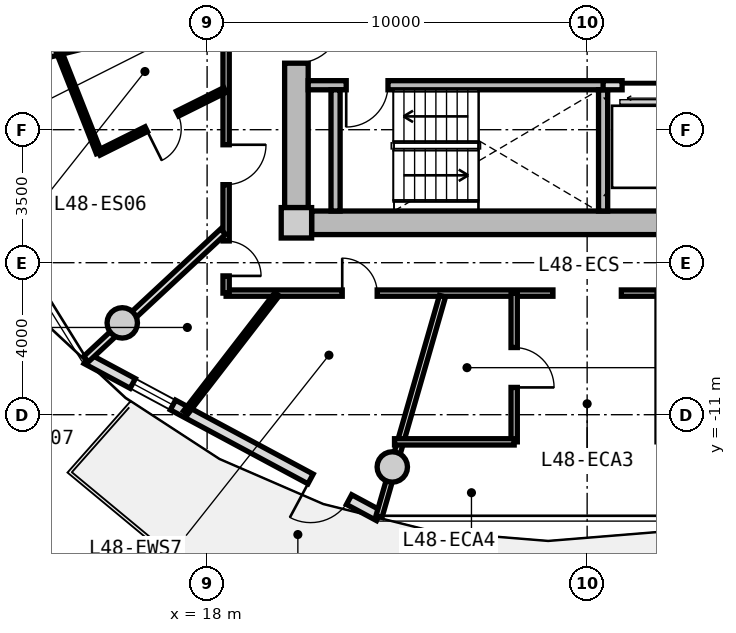
"""IFC4 building model, lengths in metres.
Left out: names, types, materials, properties, quantities, classifications, styles, units other than length and angle.
Written with IfcOpenShell. Run it as: python <this file> out.ifc"""

import sys

from ifc_helpers import new_model, si_unit, direction, frame, frame_2d, origin, origin_2d, place, context, subcontext, project, spatial, rectangle, circle, extrude, source, transform, mapped, element, fill, save


model = new_model("IFC4")
c1 = context("Model", 3, precision=1e-05, world=origin(), true_north=direction((0.0, 1.0)))
c2 = subcontext(c1, "Body", "Model", "MODEL_VIEW")
j1 = project(units=[si_unit("LENGTHUNIT", "METRE"), si_unit("PLANEANGLEUNIT", "RADIAN")], contexts=[c1])
p1 = place(None, origin())
s1 = spatial("IfcSite", under=j1, at=p1, CompositionType="ELEMENT")
p2 = place(p1, origin())
s2 = spatial("IfcBuilding", under=s1, at=p2, CompositionType="ELEMENT")
p3 = place(p2, frame((0.0, 0.0, 155.65)))
s3 = spatial("IfcBuildingStorey", under=s2, at=p3, CompositionType="ELEMENT", Elevation=155.65)
m1 = source(origin(), c2, "Body", "SweptSolid", [
    extrude(rectangle(XDim=0.8, YDim=0.8, at=origin_2d()), origin(), (0.0, 0.0, 1.0), 3.05),
])
p4 = place(p3, frame((20.35, -5.95, 0.0), z_axis=(0.0, 0.0, 1.0), x_axis=(1.0, 0.0, 0.0)))
e1 = element("IfcColumn", 1, at=p4, inside=s3, PredefinedType="COLUMN", context=c2, shape_type="MappedRepresentation", body=[
    mapped(m1, transform((0.0, 0.0, 0.0), x_axis=(1.0, 0.0, 0.0), y_axis=(0.0, 1.0, 0.0), z_axis=(0.0, 0.0, 1.0), scale=1.0)),
])
m2 = source(origin(), c2, "Body", "SweptSolid", [
    extrude(rectangle(XDim=14.5, YDim=0.62, at=frame_2d((7.25, 0.0))), origin(), (0.0, 0.0, 1.0), 2.81),
])
p5 = place(p3, frame((35.25, -5.95, 0.0), z_axis=(0.0, 0.0, 1.0), x_axis=(-1.0, 0.0, 0.0)))
e2 = element("IfcWall", 2, at=p5, inside=s3, PredefinedType="SHEAR", context=c2, shape_type="MappedRepresentation", body=[
    mapped(m2, transform((0.0, 0.0, 0.0), x_axis=(1.0, 0.0, 0.0), y_axis=(0.0, 1.0, 0.0), z_axis=(0.0, 0.0, 1.0), scale=1.0)),
])
m3 = source(origin(), c2, "Body", "SweptSolid", [
    extrude(rectangle(XDim=11.1, YDim=0.62, at=frame_2d((5.55, 0.0))), origin(), (0.0, 0.0, 1.0), 2.81),
])
p6 = place(p3, frame((20.35, -5.55, 0.0), z_axis=(0.0, 0.0, 1.0), x_axis=(0.0, 1.0, 0.0)))
e3 = element("IfcWall", 3, at=p6, inside=s3, PredefinedType="SHEAR", context=c2, shape_type="MappedRepresentation", body=[
    mapped(m3, transform((0.0, 0.0, 0.0), x_axis=(1.0, 0.0, 0.0), y_axis=(0.0, 1.0, 0.0), z_axis=(0.0, 0.0, 1.0), scale=1.0)),
])
p7 = place(p6, frame((3.8, 0.0, 0.0)))
e4 = element("IfcOpeningElement", 4, at=p7, cuts=e3, PredefinedType="OPENING", context=c2, shape_type="SweptSolid", body=[
    extrude(rectangle(XDim=1.2, YDim=2.15, at=frame_2d((0.6, 1.075))), frame((0.0, 0.32, 0.0), z_axis=(0.0, -1.0, 0.0), x_axis=(1.0, 0.0, 0.0)), (0.0, 0.0, 1.0), 0.64),
])
m4 = source(origin(), c2, "Body", "SweptSolid", [
    extrude(circle(Radius=0.4, at=origin_2d()), origin(), (0.0, 0.0, 1.0), 3.05),
])
for number, where, z_axis, x_axis in (
    (5, (15.767, -8.584, 0.0), (0.0, 0.0, 1.0), (1.0, 0.0, 0.0)),
    (6, (22.873, -12.375, 0.0), (0.0, 0.0, 1.0), (1.0, 0.0, 0.0)),
):
    element("IfcColumn", number, at=place(p3, frame(where, z_axis=z_axis, x_axis=x_axis)), inside=s3, PredefinedType="COLUMN", context=c2, shape_type="MappedRepresentation", body=[
        mapped(m4, transform((0.0, 0.0, 0.0), x_axis=(1.0, 0.0, 0.0), y_axis=(0.0, 1.0, 0.0), z_axis=(0.0, 0.0, 1.0), scale=1.0)),
    ])
m5 = source(origin(), c2, "Body", "SweptSolid", [
    extrude(rectangle(XDim=8.742, YDim=0.29, at=frame_2d((4.371, 0.0))), origin(), (0.0, 0.0, 1.0), 2.81),
])
p8 = place(p3, frame((22.529, -13.66, 0.0), z_axis=(0.0, 0.0, 1.0), x_axis=(-0.880998740657, 0.473118609823, 0.0)))
e7 = element("IfcWall", 7, at=p8, inside=s3, PredefinedType="SOLIDWALL", context=c2, shape_type="MappedRepresentation", body=[
    mapped(m5, transform((0.0, 0.0, 0.0), x_axis=(1.0, 0.0, 0.0), y_axis=(0.0, 1.0, 0.0), z_axis=(0.0, 0.0, 1.0), scale=1.0)),
])
p9 = place(p8, frame((0.9, 0.0, 0.0)))
e8 = element("IfcOpeningElement", 8, at=p9, cuts=e7, PredefinedType="OPENING", context=c2, shape_type="SweptSolid", body=[
    extrude(rectangle(XDim=1.15, YDim=2.25, at=frame_2d((0.575, 1.125))), frame((0.0, 0.155, 0.0), z_axis=(0.0, -1.0, 0.0), x_axis=(1.0, 0.0, 0.0)), (0.0, 0.0, 1.0), 0.31),
])
p10 = place(p8, frame((6.161, 0.0, 0.85)))
e9 = element("IfcOpeningElement", 9, at=p10, cuts=e7, PredefinedType="OPENING", context=c2, shape_type="SweptSolid", body=[
    extrude(rectangle(XDim=1.2, YDim=1.5, at=frame_2d((0.6, 0.75))), frame((0.0, 0.155, 0.0), z_axis=(0.0, -1.0, 0.0), x_axis=(1.0, 0.0, 0.0)), (0.0, 0.0, 1.0), 0.31),
])
m6 = source(origin(), c2, "Body", "SweptSolid", [
    extrude(rectangle(XDim=7.88, YDim=0.24, at=frame_2d((3.94, 0.0))), origin(), (0.0, 0.0, 1.0), 2.81),
])
p11 = place(p3, frame((20.66, -2.33, 0.0), z_axis=(0.0, 0.0, 1.0), x_axis=(1.0, 0.0, 0.0)))
e10 = element("IfcWall", 10, at=p11, inside=s3, PredefinedType="PARTITIONING", context=c2, shape_type="MappedRepresentation", body=[
    mapped(m6, transform((0.0, 0.0, 0.0), x_axis=(1.0, 0.0, 0.0), y_axis=(0.0, 1.0, 0.0), z_axis=(0.0, 0.0, 1.0), scale=1.0)),
])
p12 = place(p11, frame((1.0, 0.0, 0.0)))
e11 = element("IfcOpeningElement", 11, at=p12, cuts=e10, PredefinedType="OPENING", context=c2, shape_type="SweptSolid", body=[
    extrude(rectangle(XDim=1.1, YDim=2.15, at=frame_2d((0.55, 1.075))), frame((0.0, 0.13, 0.0), z_axis=(0.0, -1.0, 0.0), x_axis=(1.0, 0.0, 0.0)), (0.0, 0.0, 1.0), 0.26),
])
m7 = source(origin(), c2, "Body", "SweptSolid", [
    extrude(rectangle(XDim=3.19, YDim=0.24, at=frame_2d((1.595, 0.0))), origin(), (0.0, 0.0, 1.0), 2.81),
])
for number, where, z_axis, x_axis in (
    (12, (21.38, -5.64, 0.0), (0.0, 0.0, 1.0), (0.0, 1.0, 0.0)),
    (13, (28.42, -5.64, 0.0), (0.0, 0.0, 1.0), (0.0, 1.0, 0.0)),
):
    element("IfcWall", number, at=place(p3, frame(where, z_axis=z_axis, x_axis=x_axis)), inside=s3, PredefinedType="PARTITIONING", context=c2, shape_type="MappedRepresentation", body=[
        mapped(m7, transform((0.0, 0.0, 0.0), x_axis=(1.0, 0.0, 0.0), y_axis=(0.0, 1.0, 0.0), z_axis=(0.0, 0.0, 1.0), scale=1.0)),
    ])
m8 = source(origin(), c2, "Body", "SweptSolid", [
    extrude(rectangle(XDim=4.13, YDim=0.24, at=frame_2d((2.065, 0.0))), origin(), (0.0, 0.0, 1.0), 2.795),
])
p13 = place(p3, frame((28.42, -2.33, 0.0), z_axis=(0.0, 0.0, 1.0), x_axis=(1.0, 0.0, 0.0)))
e14 = element("IfcWall", 14, at=p13, inside=s3, PredefinedType="PARTITIONING", context=c2, shape_type="MappedRepresentation", body=[
    mapped(m8, transform((0.0, 0.0, 0.0), x_axis=(1.0, 0.0, 0.0), y_axis=(0.0, 1.0, 0.0), z_axis=(0.0, 0.0, 1.0), scale=1.0)),
])
p14 = place(p13, frame((0.5, 0.0, 0.0)))
e15 = element("IfcOpeningElement", 15, at=p14, cuts=e14, PredefinedType="OPENING", context=c2, shape_type="SweptSolid", body=[
    extrude(rectangle(XDim=1.1, YDim=2.2, at=frame_2d((0.55, 1.1))), frame((0.0, 0.13, 0.0), z_axis=(0.0, -1.0, 0.0), x_axis=(1.0, 0.0, 0.0)), (0.0, 0.0, 1.0), 0.26),
])
p15 = place(p13, frame((2.55, 0.0, 0.0)))
e16 = element("IfcOpeningElement", 16, at=p15, cuts=e14, PredefinedType="OPENING", context=c2, shape_type="SweptSolid", body=[
    extrude(rectangle(XDim=1.1, YDim=2.2, at=frame_2d((0.55, 1.1))), frame((0.0, 0.13, 0.0), z_axis=(0.0, -1.0, 0.0), x_axis=(1.0, 0.0, 0.0)), (0.0, 0.0, 1.0), 0.26),
])
m9 = source(origin(), c2, "Body", "SweptSolid", [
    extrude(rectangle(XDim=8.6, YDim=0.165, at=frame_2d((4.3, 0.0))), origin(), (0.0, 0.0, 1.0), 2.795),
])
p16 = place(p3, frame((37.5, -7.8, 0.0), z_axis=(0.0, 0.0, 1.0), x_axis=(-1.0, 0.0, 0.0)))
e17 = element("IfcWall", 17, at=p16, inside=s3, PredefinedType="PARTITIONING", context=c2, shape_type="MappedRepresentation", body=[
    mapped(m9, transform((0.0, 0.0, 0.0), x_axis=(1.0, 0.0, 0.0), y_axis=(0.0, 1.0, 0.0), z_axis=(0.0, 0.0, 1.0), scale=1.0)),
])
p17 = place(p16, frame((3.359, 0.0, 0.0)))
e18 = element("IfcOpeningElement", 18, at=p17, cuts=e17, PredefinedType="OPENING", context=c2, shape_type="SweptSolid", body=[
    extrude(rectangle(XDim=1.05, YDim=2.15, at=frame_2d((0.525, 1.075))), frame((0.0, 0.093, 0.0), z_axis=(0.0, -1.0, 0.0), x_axis=(1.0, 0.0, 0.0)), (0.0, 0.0, 1.0), 0.185),
])
p18 = place(p3, frame((27.1, -7.8, 0.0), z_axis=(0.0, 0.0, 1.0), x_axis=(-1.0, 0.0, 0.0)))
e19 = element("IfcWall", 19, at=p18, inside=s3, PredefinedType="PARTITIONING", context=c2, shape_type="MappedRepresentation", body=[
    mapped(m9, transform((0.0, 0.0, 0.0), x_axis=(1.0, 0.0, 0.0), y_axis=(0.0, 1.0, 0.0), z_axis=(0.0, 0.0, 1.0), scale=1.0)),
])
p19 = place(p18, frame((4.625, 0.0, 0.0)))
e20 = element("IfcOpeningElement", 20, at=p19, cuts=e19, PredefinedType="OPENING", context=c2, shape_type="SweptSolid", body=[
    extrude(rectangle(XDim=0.92, YDim=2.1, at=frame_2d((0.46, 1.05))), frame((0.0, 0.093, 0.0), z_axis=(0.0, -1.0, 0.0), x_axis=(1.0, 0.0, 0.0)), (0.0, 0.0, 1.0), 0.185),
])
m10 = source(origin(), c2, "Body", "SweptSolid", [
    extrude(rectangle(XDim=15.6, YDim=0.165, at=frame_2d((7.8, 0.0))), origin(), (0.0, 0.0, 1.0), 2.795),
])
p20 = place(p3, frame((18.5, -7.8, 0.0), z_axis=(0.0, 0.0, 1.0), x_axis=(0.0, 1.0, 0.0)))
e21 = element("IfcWall", 21, at=p20, inside=s3, PredefinedType="PARTITIONING", context=c2, shape_type="MappedRepresentation", body=[
    mapped(m10, transform((0.0, 0.0, 0.0), x_axis=(1.0, 0.0, 0.0), y_axis=(0.0, 1.0, 0.0), z_axis=(0.0, 0.0, 1.0), scale=1.0)),
])
p21 = place(p20, frame((12.591, 0.0, 0.0)))
e22 = element("IfcOpeningElement", 22, at=p21, cuts=e21, PredefinedType="OPENING", context=c2, shape_type="SweptSolid", body=[
    extrude(rectangle(XDim=1.05, YDim=2.15, at=frame_2d((0.525, 1.075))), frame((0.0, 0.093, 0.0), z_axis=(0.0, -1.0, 0.0), x_axis=(1.0, 0.0, 0.0)), (0.0, 0.0, 1.0), 0.185),
])
p22 = place(p20, frame((8.081, 0.0, 0.0)))
e23 = element("IfcOpeningElement", 23, at=p22, cuts=e21, PredefinedType="OPENING", context=c2, shape_type="SweptSolid", body=[
    extrude(rectangle(XDim=1.05, YDim=2.15, at=frame_2d((0.525, 1.075))), frame((0.0, 0.093, 0.0), z_axis=(0.0, -1.0, 0.0), x_axis=(1.0, 0.0, 0.0)), (0.0, 0.0, 1.0), 0.185),
])
p23 = place(p20, frame((2.854, 0.0, 0.0)))
e24 = element("IfcOpeningElement", 24, at=p23, cuts=e21, PredefinedType="OPENING", context=c2, shape_type="SweptSolid", body=[
    extrude(rectangle(XDim=1.05, YDim=2.15, at=frame_2d((0.525, 1.075))), frame((0.0, 0.093, 0.0), z_axis=(0.0, -1.0, 0.0), x_axis=(1.0, 0.0, 0.0)), (0.0, 0.0, 1.0), 0.185),
])
p24 = place(p20, frame((0.452, 0.0, 0.0)))
e25 = element("IfcOpeningElement", 25, at=p24, cuts=e21, PredefinedType="OPENING", context=c2, shape_type="SweptSolid", body=[
    extrude(rectangle(XDim=0.92, YDim=2.1, at=frame_2d((0.46, 1.05))), frame((0.0, 0.093, 0.0), z_axis=(0.0, -1.0, 0.0), x_axis=(1.0, 0.0, 0.0)), (0.0, 0.0, 1.0), 0.185),
])
m11 = source(origin(), c2, "Body", "SweptSolid", [
    extrude(rectangle(XDim=6.035, YDim=0.165, at=frame_2d((3.018, 0.0))), origin(), (0.0, 0.0, 1.0), 2.345),
])
p25 = place(p3, frame((24.194, -7.88, 0.0), z_axis=(0.0, 0.0, 1.0), x_axis=(-0.276809454862, -0.960924828329, 0.0)))
e26 = element("IfcWall", 26, at=p25, inside=s3, PredefinedType="PARTITIONING", context=c2, shape_type="MappedRepresentation", body=[
    mapped(m11, transform((0.0, 0.0, 0.0), x_axis=(1.0, 0.0, 0.0), y_axis=(0.0, 1.0, 0.0), z_axis=(0.0, 0.0, 1.0), scale=1.0)),
])
m12 = source(origin(), c2, "Body", "SweptSolid", [
    extrude(rectangle(XDim=3.915, YDim=0.165, at=frame_2d((1.957, 0.0))), origin(), (0.0, 0.0, 1.0), 2.795),
])
p26 = place(p3, frame((26.08, -11.715, 0.0), z_axis=(0.0, 0.0, 1.0), x_axis=(0.0, 1.0, 0.0)))
e27 = element("IfcWall", 27, at=p26, inside=s3, PredefinedType="PARTITIONING", context=c2, shape_type="MappedRepresentation", body=[
    mapped(m12, transform((0.0, 0.0, 0.0), x_axis=(1.0, 0.0, 0.0), y_axis=(0.0, 1.0, 0.0), z_axis=(0.0, 0.0, 1.0), scale=1.0)),
])
p27 = place(p26, frame((1.432, 0.0, 0.0)))
e28 = element("IfcOpeningElement", 28, at=p27, cuts=e27, PredefinedType="OPENING", context=c2, shape_type="SweptSolid", body=[
    extrude(rectangle(XDim=1.05, YDim=2.15, at=frame_2d((0.525, 1.075))), frame((0.0, 0.093, 0.0), z_axis=(0.0, -1.0, 0.0), x_axis=(1.0, 0.0, 0.0)), (0.0, 0.0, 1.0), 0.185),
])
m13 = source(origin(), c2, "Body", "SweptSolid", [
    extrude(rectangle(XDim=3.149, YDim=0.165, at=frame_2d((1.574, 0.0))), origin(), (0.0, 0.0, 1.0), 2.795),
])
p28 = place(p3, frame((22.931, -11.715, 0.0), z_axis=(0.0, 0.0, 1.0), x_axis=(1.0, 0.0, 0.0)))
e29 = element("IfcWall", 29, at=p28, inside=s3, PredefinedType="PARTITIONING", context=c2, shape_type="MappedRepresentation", body=[
    mapped(m13, transform((0.0, 0.0, 0.0), x_axis=(1.0, 0.0, 0.0), y_axis=(0.0, 1.0, 0.0), z_axis=(0.0, 0.0, 1.0), scale=1.0)),
])
m14 = source(origin(), c2, "Body", "SweptSolid", [
    extrude(rectangle(XDim=8.305, YDim=0.19, at=frame_2d((4.153, 0.0))), origin(), (0.0, 0.0, 1.0), 2.345),
])
p29 = place(p3, frame((18.42, -0.357, 0.0), z_axis=(0.0, 0.0, 1.0), x_axis=(-0.970309994378, -0.241864662175, 0.0)))
e30 = element("IfcWall", 30, at=p29, inside=s3, PredefinedType="PARTITIONING", context=c2, shape_type="MappedRepresentation", body=[
    mapped(m14, transform((0.0, 0.0, 0.0), x_axis=(1.0, 0.0, 0.0), y_axis=(0.0, 1.0, 0.0), z_axis=(0.0, 0.0, 1.0), scale=1.0)),
])
m15 = source(origin(), c2, "Body", "SweptSolid", [
    extrude(rectangle(XDim=4.927, YDim=0.19, at=frame_2d((2.463, 0.0))), origin(), (0.0, 0.0, 1.0), 2.345),
])
p30 = place(p3, frame((18.42, -6.183, 0.0), z_axis=(0.0, 0.0, 1.0), x_axis=(-0.732191335987, -0.681098999783, 0.0)))
e31 = element("IfcWall", 31, at=p30, inside=s3, PredefinedType="PARTITIONING", context=c2, shape_type="MappedRepresentation", body=[
    mapped(m15, transform((0.0, 0.0, 0.0), x_axis=(1.0, 0.0, 0.0), y_axis=(0.0, 1.0, 0.0), z_axis=(0.0, 0.0, 1.0), scale=1.0)),
])
m16 = source(origin(), c2, "Body", "SweptSolid", [
    extrude(rectangle(XDim=3.707, YDim=0.14, at=frame_2d((1.854, 0.0))), origin(), (0.0, 0.0, 1.0), 2.795),
])
p31 = place(p3, frame((18.47, -2.456, 0.0), z_axis=(0.0, 0.0, 1.0), x_axis=(-0.895347377717, -0.44536846904, 0.0)))
e32 = element("IfcWall", 32, at=p31, inside=s3, PredefinedType="PARTITIONING", context=c2, shape_type="MappedRepresentation", body=[
    mapped(m16, transform((0.0, 0.0, 0.0), x_axis=(1.0, 0.0, 0.0), y_axis=(0.0, 1.0, 0.0), z_axis=(0.0, 0.0, 1.0), scale=1.0)),
])
p32 = place(p31, frame((1.394, 0.0, 0.0)))
e33 = element("IfcOpeningElement", 33, at=p32, cuts=e32, PredefinedType="OPENING", context=c2, shape_type="SweptSolid", body=[
    extrude(rectangle(XDim=0.92, YDim=2.1, at=frame_2d((0.46, 1.05))), frame((0.0, 0.08, 0.0), z_axis=(0.0, -1.0, 0.0), x_axis=(1.0, 0.0, 0.0)), (0.0, 0.0, 1.0), 0.16),
])
m17 = source(origin(), c2, "Body", "SweptSolid", [
    extrude(rectangle(XDim=2.854, YDim=0.14, at=frame_2d((1.427, 0.0))), origin(), (0.0, 0.0, 1.0), 2.795),
])
p33 = place(p3, frame((15.151, -4.107, 0.0), z_axis=(0.0, 0.0, 1.0), x_axis=(-0.366932834407, 0.930247437532, 0.0)))
e34 = element("IfcWall", 34, at=p33, inside=s3, PredefinedType="PARTITIONING", context=c2, shape_type="MappedRepresentation", body=[
    mapped(m17, transform((0.0, 0.0, 0.0), x_axis=(1.0, 0.0, 0.0), y_axis=(0.0, 1.0, 0.0), z_axis=(0.0, 0.0, 1.0), scale=1.0)),
])
m18 = source(origin(), c2, "Body", "SweptSolid", [
    extrude(rectangle(XDim=3.937, YDim=0.14, at=frame_2d((1.968, 0.0))), origin(), (0.0, 0.0, 1.0), 2.795),
])
p34 = place(p3, frame((19.84, -7.83, 0.0), z_axis=(0.0, 0.0, 1.0), x_axis=(-0.611055586441, -0.79158768957, 0.0)))
e35 = element("IfcWall", 35, at=p34, inside=s3, PredefinedType="PARTITIONING", context=c2, shape_type="MappedRepresentation", body=[
    mapped(m18, transform((0.0, 0.0, 0.0), x_axis=(1.0, 0.0, 0.0), y_axis=(0.0, 1.0, 0.0), z_axis=(0.0, 0.0, 1.0), scale=1.0)),
])
m19 = source(origin(), c2, "Body", "SweptSolid", [
    extrude(rectangle(XDim=1.15, YDim=2.25, at=frame_2d((0.575, 1.125))), frame((0.0, 0.025, 0.0), z_axis=(0.0, -1.0, 0.0), x_axis=(1.0, 0.0, 0.0)), (0.0, 0.0, 1.0), 0.05),
])
p35 = place(p9, origin())
e36 = element("IfcDoor", 36, at=p35, inside=s3, OperationType="SINGLE_SWING_RIGHT", PredefinedType="DOOR", context=c2, shape_type="MappedRepresentation", body=[
    mapped(m19, transform((0.0, 0.0, 0.0), x_axis=(1.0, 0.0, 0.0), y_axis=(0.0, 1.0, 0.0), z_axis=(0.0, 0.0, 1.0), scale=1.0)),
])
fill(e8, e36)
m20 = source(origin(), c2, "Body", "SweptSolid", [
    extrude(rectangle(XDim=1.2, YDim=1.5, at=frame_2d((0.6, 0.75))), frame((0.0, 0.03, 0.0), z_axis=(0.0, -1.0, 0.0), x_axis=(1.0, 0.0, 0.0)), (0.0, 0.0, 1.0), 0.06),
])
p36 = place(p10, origin())
e37 = element("IfcWindow", 37, at=p36, inside=s3, PartitioningType="SINGLE_PANEL", PredefinedType="WINDOW", context=c2, shape_type="MappedRepresentation", body=[
    mapped(m20, transform((0.0, 0.0, 0.0), x_axis=(1.0, 0.0, 0.0), y_axis=(0.0, 1.0, 0.0), z_axis=(0.0, 0.0, 1.0), scale=1.0)),
])
fill(e9, e37)
m21 = source(origin(), c2, "Body", "SweptSolid", [
    extrude(rectangle(XDim=1.1, YDim=2.15, at=frame_2d((0.55, 1.075))), frame((0.0, 0.025, 0.0), z_axis=(0.0, -1.0, 0.0), x_axis=(1.0, 0.0, 0.0)), (0.0, 0.0, 1.0), 0.05),
])
p37 = place(p12, frame((1.1, 0.0, 0.0), z_axis=(0.0, 0.0, 1.0), x_axis=(-1.0, 0.0, 0.0)))
e38 = element("IfcDoor", 38, at=p37, inside=s3, OperationType="SINGLE_SWING_RIGHT", PredefinedType="DOOR", context=c2, shape_type="MappedRepresentation", body=[
    mapped(m21, transform((0.0, 0.0, 0.0), x_axis=(1.0, 0.0, 0.0), y_axis=(0.0, 1.0, 0.0), z_axis=(0.0, 0.0, 1.0), scale=1.0)),
])
fill(e11, e38)
m22 = source(origin(), c2, "Body", "SweptSolid", [
    extrude(rectangle(XDim=1.2, YDim=2.15, at=frame_2d((0.6, 1.075))), frame((0.0, 0.025, 0.0), z_axis=(0.0, -1.0, 0.0), x_axis=(1.0, 0.0, 0.0)), (0.0, 0.0, 1.0), 0.05),
])
p38 = place(p7, frame((1.2, 0.0, 0.0), z_axis=(0.0, 0.0, 1.0), x_axis=(-1.0, 0.0, 0.0)))
e39 = element("IfcDoor", 39, at=p38, inside=s3, OperationType="SINGLE_SWING_LEFT", PredefinedType="DOOR", context=c2, shape_type="MappedRepresentation", body=[
    mapped(m22, transform((0.0, 0.0, 0.0), x_axis=(1.0, 0.0, 0.0), y_axis=(0.0, 1.0, 0.0), z_axis=(0.0, 0.0, 1.0), scale=1.0)),
])
fill(e4, e39)
m23 = source(origin(), c2, "Body", "SweptSolid", [
    extrude(rectangle(XDim=1.1, YDim=2.2, at=frame_2d((0.55, 1.1))), frame((0.0, 0.025, 0.0), z_axis=(0.0, -1.0, 0.0), x_axis=(1.0, 0.0, 0.0)), (0.0, 0.0, 1.0), 0.05),
])
p39 = place(p14, frame((1.1, 0.0, 0.0), z_axis=(0.0, 0.0, 1.0), x_axis=(-1.0, 0.0, 0.0)))
e40 = element("IfcDoor", 40, at=p39, inside=s3, OperationType="SLIDING_TO_LEFT", PredefinedType="DOOR", context=c2, shape_type="MappedRepresentation", body=[
    mapped(m23, transform((0.0, 0.0, 0.0), x_axis=(1.0, 0.0, 0.0), y_axis=(0.0, 1.0, 0.0), z_axis=(0.0, 0.0, 1.0), scale=1.0)),
])
fill(e15, e40)
m24 = source(origin(), c2, "Body", "SweptSolid", [
    extrude(rectangle(XDim=1.05, YDim=2.15, at=frame_2d((0.525, 1.075))), frame((0.0, 0.025, 0.0), z_axis=(0.0, -1.0, 0.0), x_axis=(1.0, 0.0, 0.0)), (0.0, 0.0, 1.0), 0.05),
])
p40 = place(p27, frame((1.05, 0.0, 0.0), z_axis=(0.0, 0.0, 1.0), x_axis=(-1.0, 0.0, 0.0)))
e41 = element("IfcDoor", 41, at=p40, inside=s3, OperationType="SINGLE_SWING_RIGHT", PredefinedType="DOOR", context=c2, shape_type="MappedRepresentation", body=[
    mapped(m24, transform((0.0, 0.0, 0.0), x_axis=(1.0, 0.0, 0.0), y_axis=(0.0, 1.0, 0.0), z_axis=(0.0, 0.0, 1.0), scale=1.0)),
])
fill(e28, e41)
p41 = place(p23, frame((1.05, 0.0, 0.0), z_axis=(0.0, 0.0, 1.0), x_axis=(-1.0, 0.0, 0.0)))
e42 = element("IfcDoor", 42, at=p41, inside=s3, OperationType="SINGLE_SWING_LEFT", PredefinedType="DOOR", context=c2, shape_type="MappedRepresentation", body=[
    mapped(m24, transform((0.0, 0.0, 0.0), x_axis=(1.0, 0.0, 0.0), y_axis=(0.0, 1.0, 0.0), z_axis=(0.0, 0.0, 1.0), scale=1.0)),
])
fill(e24, e42)
m25 = source(origin(), c2, "Body", "SweptSolid", [
    extrude(rectangle(XDim=0.92, YDim=2.1, at=frame_2d((0.46, 1.05))), frame((0.0, 0.025, 0.0), z_axis=(0.0, -1.0, 0.0), x_axis=(1.0, 0.0, 0.0)), (0.0, 0.0, 1.0), 0.05),
])
p42 = place(p32, origin())
e43 = element("IfcDoor", 43, at=p42, inside=s3, OperationType="SINGLE_SWING_RIGHT", PredefinedType="DOOR", context=c2, shape_type="MappedRepresentation", body=[
    mapped(m25, transform((0.0, 0.0, 0.0), x_axis=(1.0, 0.0, 0.0), y_axis=(0.0, 1.0, 0.0), z_axis=(0.0, 0.0, 1.0), scale=1.0)),
])
fill(e33, e43)
p43 = place(p24, frame((0.92, 0.0, 0.0), z_axis=(0.0, 0.0, 1.0), x_axis=(-1.0, 0.0, 0.0)))
e44 = element("IfcDoor", 44, at=p43, inside=s3, OperationType="SINGLE_SWING_RIGHT", PredefinedType="DOOR", context=c2, shape_type="MappedRepresentation", body=[
    mapped(m25, transform((0.0, 0.0, 0.0), x_axis=(1.0, 0.0, 0.0), y_axis=(0.0, 1.0, 0.0), z_axis=(0.0, 0.0, 1.0), scale=1.0)),
])
fill(e25, e44)
p44 = place(p19, frame((0.92, 0.0, 0.0), z_axis=(0.0, 0.0, 1.0), x_axis=(-1.0, 0.0, 0.0)))
e45 = element("IfcDoor", 45, at=p44, inside=s3, OperationType="SINGLE_SWING_LEFT", PredefinedType="DOOR", context=c2, shape_type="MappedRepresentation", body=[
    mapped(m25, transform((0.0, 0.0, 0.0), x_axis=(1.0, 0.0, 0.0), y_axis=(0.0, 1.0, 0.0), z_axis=(0.0, 0.0, 1.0), scale=1.0)),
])
fill(e20, e45)
save(model, sys.argv[1])
